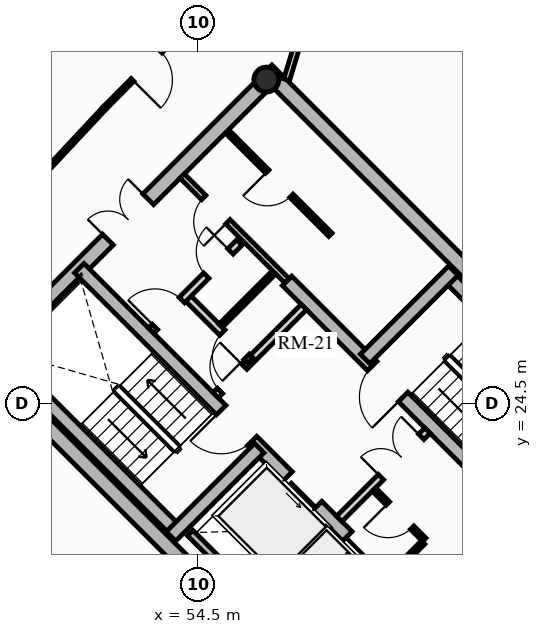
"""IFC4 building model, lengths in metres.
Left out: names, types, materials, properties, quantities, classifications, styles, units other than length and angle.
Written with IfcOpenShell. Run it as: python <this file> out.ifc"""

import sys

from ifc_helpers import new_model, si_unit, direction, frame, frame_2d, origin, origin_2d, place, context, subcontext, project, spatial, rectangle, hollow_circle, extrude, source, transform, mapped, element, fill, save


model = new_model("IFC4")
c1 = context("Model", 3, precision=1e-05, world=origin(), true_north=direction((0.0, 1.0)))
c2 = subcontext(c1, "Body", "Model", "MODEL_VIEW")
j1 = project(units=[si_unit("LENGTHUNIT", "METRE"), si_unit("PLANEANGLEUNIT", "RADIAN")], contexts=[c1])
p1 = place(None, origin())
s1 = spatial("IfcSite", under=j1, at=p1, CompositionType="ELEMENT")
p2 = place(p1, origin())
s2 = spatial("IfcBuilding", under=s1, at=p2, CompositionType="ELEMENT")
p3 = place(p2, frame((0.0, 0.0, 229.25)))
s3 = spatial("IfcBuildingStorey", under=s2, at=p3, CompositionType="ELEMENT", Elevation=229.25)
for number, where, z_axis, x_axis in (
    (1, (58.702, 15.732, 0.0), (0.0, 0.0, 1.0), (-0.707, 0.707, 0.0)),
    (2, (66.268, 23.298, 0.0), (0.0, 0.0, 1.0), (-0.707, 0.707, 0.0)),
):
    element("IfcWall", number, at=place(p3, frame(where, z_axis=z_axis, x_axis=x_axis)), inside=s3, PredefinedType="SHEAR", context=c2, shape_type="SweptSolid", body=[
        extrude(rectangle(XDim=14.1, YDim=0.4, at=frame_2d((7.05, 0.0))), origin(), (0.0, 0.0, 1.0), 3.2),
    ])
p4 = place(p3, frame((58.561, 15.873, 0.0), z_axis=(0.0, 0.0, 1.0), x_axis=(0.707106781187, 0.707106781187, 0.0)))
e3 = element("IfcWall", 3, at=p4, inside=s3, PredefinedType="SHEAR", context=c2, shape_type="SweptSolid", body=[
    extrude(rectangle(XDim=10.7, YDim=0.4, at=frame_2d((5.35, 0.0))), origin(), (0.0, 0.0, 1.0), 3.2),
])
m1 = source(origin(), c2, "Body", "SweptSolid", [
    extrude(rectangle(XDim=1.5, YDim=2.02, at=frame_2d((0.75, 1.01))), frame((0.0, 0.21, 0.0), z_axis=(0.0, -1.0, 0.0), x_axis=(1.0, 0.0, 0.0)), (0.0, 0.0, 1.0), 0.42),
])
p5 = place(p4, frame((5.45, 0.0, 0.0)))
e4 = element("IfcOpeningElement", 4, at=p5, cuts=e3, PredefinedType="OPENING", context=c2, shape_type="MappedRepresentation", body=[
    mapped(m1, transform((0.0, 0.0, 0.0), x_axis=(1.0, 0.0, 0.0), y_axis=(0.0, 1.0, 0.0), z_axis=(0.0, 0.0, 1.0), scale=1.0)),
])
p6 = place(p3, frame((48.873, 25.561, 0.0), z_axis=(0.0, 0.0, 1.0), x_axis=(0.707106781187, 0.707106781187, 0.0)))
e5 = element("IfcWall", 5, at=p6, inside=s3, PredefinedType="SHEAR", context=c2, shape_type="SweptSolid", body=[
    extrude(rectangle(XDim=10.7, YDim=0.4, at=frame_2d((5.35, 0.0))), origin(), (0.0, 0.0, 1.0), 3.2),
])
p7 = place(p6, frame((4.6, 0.0, 0.0)))
e6 = element("IfcOpeningElement", 6, at=p7, cuts=e5, PredefinedType="OPENING", context=c2, shape_type="MappedRepresentation", body=[
    mapped(m1, transform((0.0, 0.0, 0.0), x_axis=(1.0, 0.0, 0.0), y_axis=(0.0, 1.0, 0.0), z_axis=(0.0, 0.0, 1.0), scale=1.0)),
])
p8 = place(p3, frame((61.06, 18.373, 0.0), z_axis=(0.0, 0.0, 1.0), x_axis=(-0.707106781187, 0.707106781187, 0.0)))
e7 = element("IfcWall", 7, at=p8, inside=s3, PredefinedType="SHEAR", context=c2, shape_type="SweptSolid", body=[
    extrude(rectangle(XDim=13.7, YDim=0.35, at=frame_2d((6.85, 0.0))), origin(), (0.0, 0.0, 1.0), 3.2),
])
m2 = source(origin(), c2, "Body", "SweptSolid", [
    extrude(rectangle(XDim=1.1, YDim=2.015, at=frame_2d((0.55, 1.007))), frame((0.0, 0.185, 0.0), z_axis=(0.0, -1.0, 0.0), x_axis=(1.0, 0.0, 0.0)), (0.0, 0.0, 1.0), 0.37),
])
p9 = place(p8, frame((4.85, 0.0, 0.0)))
e8 = element("IfcOpeningElement", 8, at=p9, cuts=e7, PredefinedType="OPENING", context=c2, shape_type="MappedRepresentation", body=[
    mapped(m2, transform((0.0, 0.0, 0.0), x_axis=(1.0, 0.0, 0.0), y_axis=(0.0, 1.0, 0.0), z_axis=(0.0, 0.0, 1.0), scale=1.0)),
])
p10 = place(p8, frame((0.625, 0.0, 0.0)))
e9 = element("IfcOpeningElement", 9, at=p10, cuts=e7, PredefinedType="OPENING", context=c2, shape_type="MappedRepresentation", body=[
    mapped(m2, transform((0.0, 0.0, 0.0), x_axis=(1.0, 0.0, 0.0), y_axis=(0.0, 1.0, 0.0), z_axis=(0.0, 0.0, 1.0), scale=1.0)),
])
p11 = place(p8, frame((2.625, 0.0, 0.0)))
e10 = element("IfcOpeningElement", 10, at=p11, cuts=e7, PredefinedType="OPENING", context=c2, shape_type="MappedRepresentation", body=[
    mapped(m2, transform((0.0, 0.0, 0.0), x_axis=(1.0, 0.0, 0.0), y_axis=(0.0, 1.0, 0.0), z_axis=(0.0, 0.0, 1.0), scale=1.0)),
])
m3 = source(origin(), c2, "Body", "SweptSolid", [
    extrude(rectangle(XDim=1.15, YDim=2.02, at=frame_2d((0.575, 1.01))), frame((0.0, 0.185, 0.0), z_axis=(0.0, -1.0, 0.0), x_axis=(1.0, 0.0, 0.0)), (0.0, 0.0, 1.0), 0.37),
])
p12 = place(p8, frame((7.27, 0.0, 0.0)))
e11 = element("IfcOpeningElement", 11, at=p12, cuts=e7, PredefinedType="OPENING", context=c2, shape_type="MappedRepresentation", body=[
    mapped(m3, transform((0.0, 0.0, 0.0), x_axis=(1.0, 0.0, 0.0), y_axis=(0.0, 1.0, 0.0), z_axis=(0.0, 0.0, 1.0), scale=1.0)),
])
p13 = place(p3, frame((63.627, 20.94, 0.0), z_axis=(0.0, 0.0, 1.0), x_axis=(-0.707119496762, 0.707094065383, 0.0)))
e12 = element("IfcWall", 12, at=p13, inside=s3, PredefinedType="SHEAR", context=c2, shape_type="SweptSolid", body=[
    extrude(rectangle(XDim=9.6, YDim=0.35, at=frame_2d((4.8, 0.0))), origin(), (0.0, 0.0, 1.0), 3.2),
])
p14 = place(p13, frame((5.28, 0.0, 0.0)))
e13 = element("IfcOpeningElement", 13, at=p14, cuts=e12, PredefinedType="OPENING", context=c2, shape_type="MappedRepresentation", body=[
    mapped(m3, transform((0.0, 0.0, 0.0), x_axis=(1.0, 0.0, 0.0), y_axis=(0.0, 1.0, 0.0), z_axis=(0.0, 0.0, 1.0), scale=1.0)),
])
p15 = place(p3, frame((53.922, 21.141, 0.0), z_axis=(0.0, 0.0, 1.0), x_axis=(-0.707106781187, 0.707106781187, 0.0)))
e14 = element("IfcWall", 14, at=p15, inside=s3, PredefinedType="SHEAR", context=c2, shape_type="SweptSolid", body=[
    extrude(rectangle(XDim=6.695, YDim=0.35, at=frame_2d((3.348, 0.0))), origin(), (0.0, 0.0, 1.0), 3.2),
])
p16 = place(p3, frame((53.784, 21.003, 0.0), z_axis=(0.0, 0.0, 1.0), x_axis=(0.707106781187, 0.707106781187, 0.0)))
e15 = element("IfcWall", 15, at=p16, inside=s3, PredefinedType="SHEAR", context=c2, shape_type="SweptSolid", body=[
    extrude(rectangle(XDim=3.285, YDim=0.35, at=frame_2d((1.643, 0.0))), origin(), (0.0, 0.0, 1.0), 3.2),
])
p17 = place(p3, frame((65.812, 23.125, 0.0), z_axis=(0.0, 0.0, 1.0), x_axis=(-0.707106781187, 0.707106781187, 0.0)))
e16 = element("IfcWall", 16, at=p17, inside=s3, PredefinedType="SHEAR", context=c2, shape_type="SweptSolid", body=[
    extrude(rectangle(XDim=6.695, YDim=0.35, at=frame_2d((3.348, 0.0))), origin(), (0.0, 0.0, 1.0), 3.2),
])
p18 = place(p3, frame((58.893, 25.674, 0.0), z_axis=(0.0, 0.0, 1.0), x_axis=(0.707106781187, 0.707106781187, 0.0)))
e17 = element("IfcWall", 17, at=p18, inside=s3, PredefinedType="SHEAR", context=c2, shape_type="SweptSolid", body=[
    extrude(rectangle(XDim=3.285, YDim=0.35, at=frame_2d((1.643, 0.0))), origin(), (0.0, 0.0, 1.0), 3.2),
])
p19 = place(p3, frame((56.294, 33.024, 0.0), z_axis=(0.0, 0.0, 1.0), x_axis=(0.707106781187, 0.707106781187, 0.0)))
e18 = element("IfcColumn", 18, at=p19, inside=s3, PredefinedType="COLUMN", context=c2, shape_type="SweptSolid", body=[
    extrude(hollow_circle(Radius=0.33, WallThickness=0.025, at=origin_2d()), origin(), (0.0, 0.0, 1.0), 3.2),
])
p20 = place(p3, frame((55.888, 19.069, 0.0), z_axis=(0.0, 0.0, 1.0), x_axis=(0.707106781187, 0.707106781187, 0.0)))
e19 = element("IfcWall", 19, at=p20, inside=s3, PredefinedType="SHEAR", context=c2, shape_type="SweptSolid", body=[
    extrude(rectangle(XDim=2.97, YDim=0.2, at=frame_2d((1.485, 0.0))), origin(), (0.0, 0.0, 1.0), 3.2),
])
p21 = place(p3, frame((56.015, 19.366, 0.0), z_axis=(0.0, 0.0, 1.0), x_axis=(-0.707106781187, 0.707106781187, 0.0)))
e20 = element("IfcWall", 20, at=p21, inside=s3, PredefinedType="SHEAR", context=c2, shape_type="SweptSolid", body=[
    extrude(rectangle(XDim=2.44, YDim=0.2, at=frame_2d((1.22, 0.0))), origin(), (0.0, 0.0, 1.0), 3.2),
])
p22 = place(p3, frame((58.214, 21.467, 0.0), z_axis=(0.0, 0.0, 1.0), x_axis=(0.707106781187, 0.707106781187, 0.0)))
e21 = element("IfcWall", 21, at=p22, inside=s3, PredefinedType="PARTITIONING", context=c2, shape_type="SweptSolid", body=[
    extrude(rectangle(XDim=3.28, YDim=0.2, at=frame_2d((1.64, 0.0))), origin(), (0.0, 0.0, 1.0), 2.975),
])
m4 = source(origin(), c2, "Body", "SweptSolid", [
    extrude(rectangle(XDim=1.5, YDim=2.02, at=frame_2d((0.75, 1.01))), frame((0.0, 0.11, 0.0), z_axis=(0.0, -1.0, 0.0), x_axis=(1.0, 0.0, 0.0)), (0.0, 0.0, 1.0), 0.22),
])
p23 = place(p22, frame((1.55, 0.0, 0.0)))
e22 = element("IfcOpeningElement", 22, at=p23, cuts=e21, PredefinedType="OPENING", context=c2, shape_type="MappedRepresentation", body=[
    mapped(m4, transform((0.0, 0.0, 0.0), x_axis=(1.0, 0.0, 0.0), y_axis=(0.0, 1.0, 0.0), z_axis=(0.0, 0.0, 1.0), scale=1.0)),
])
p24 = place(p3, frame((54.961, 24.719, 0.0), z_axis=(0.0, 0.0, 1.0), x_axis=(0.707106781187, 0.707106781187, 0.0)))
e23 = element("IfcWall", 23, at=p24, inside=s3, PredefinedType="PARTITIONING", context=c2, shape_type="SweptSolid", body=[
    extrude(rectangle(XDim=3.28, YDim=0.2, at=frame_2d((1.64, 0.0))), origin(), (0.0, 0.0, 1.0), 2.975),
])
m5 = source(origin(), c2, "Body", "SweptSolid", [
    extrude(rectangle(XDim=0.9, YDim=2.005, at=frame_2d((0.45, 1.002))), frame((0.0, 0.11, 0.0), z_axis=(0.0, -1.0, 0.0), x_axis=(1.0, 0.0, 0.0)), (0.0, 0.0, 1.0), 0.22),
])
p25 = place(p24, frame((0.16, 0.0, 0.0)))
e24 = element("IfcOpeningElement", 24, at=p25, cuts=e23, PredefinedType="OPENING", context=c2, shape_type="MappedRepresentation", body=[
    mapped(m5, transform((0.0, 0.0, 0.0), x_axis=(1.0, 0.0, 0.0), y_axis=(0.0, 1.0, 0.0), z_axis=(0.0, 0.0, 1.0), scale=1.0)),
])
p26 = place(p3, frame((55.874, 25.631, 0.0), z_axis=(0.0, 0.0, 1.0), x_axis=(-0.707157639372, 0.707055919343, 0.0)))
e25 = element("IfcWall", 25, at=p26, inside=s3, PredefinedType="PARTITIONING", context=c2, shape_type="SweptSolid", body=[
    extrude(rectangle(XDim=2.4, YDim=0.2, at=frame_2d((1.2, 0.0))), origin(), (0.0, 0.0, 1.0), 2.975),
])
p27 = place(p26, frame((0.14, 0.0, 0.0)))
e26 = element("IfcOpeningElement", 26, at=p27, cuts=e25, PredefinedType="OPENING", context=c2, shape_type="MappedRepresentation", body=[
    mapped(m5, transform((0.0, 0.0, 0.0), x_axis=(1.0, 0.0, 0.0), y_axis=(0.0, 1.0, 0.0), z_axis=(0.0, 0.0, 1.0), scale=1.0)),
])
p28 = place(p3, frame((53.264, 26.416, 0.0), z_axis=(0.0, 0.0, 1.0), x_axis=(0.707106781187, 0.707106781187, 0.0)))
e27 = element("IfcWall", 27, at=p28, inside=s3, PredefinedType="PARTITIONING", context=c2, shape_type="SweptSolid", body=[
    extrude(rectangle(XDim=3.28, YDim=0.2, at=frame_2d((1.64, 0.0))), origin(), (0.0, 0.0, 1.0), 2.975),
])
m6 = source(origin(), c2, "Body", "SweptSolid", [
    extrude(rectangle(XDim=1.0, YDim=2.015, at=frame_2d((0.5, 1.007))), frame((0.0, 0.11, 0.0), z_axis=(0.0, -1.0, 0.0), x_axis=(1.0, 0.0, 0.0)), (0.0, 0.0, 1.0), 0.22),
])
p29 = place(p28, frame((0.14, 0.0, 0.0)))
e28 = element("IfcOpeningElement", 28, at=p29, cuts=e27, PredefinedType="OPENING", context=c2, shape_type="MappedRepresentation", body=[
    mapped(m6, transform((0.0, 0.0, 0.0), x_axis=(1.0, 0.0, 0.0), y_axis=(0.0, 1.0, 0.0), z_axis=(0.0, 0.0, 1.0), scale=1.0)),
])
p30 = place(p28, frame((2.05, 0.0, 0.0)))
e29 = element("IfcOpeningElement", 29, at=p30, cuts=e27, PredefinedType="OPENING", context=c2, shape_type="MappedRepresentation", body=[
    mapped(m5, transform((0.0, 0.0, 0.0), x_axis=(1.0, 0.0, 0.0), y_axis=(0.0, 1.0, 0.0), z_axis=(0.0, 0.0, 1.0), scale=1.0)),
])
p31 = place(p3, frame((60.448, 20.915, 0.0), z_axis=(0.0, 0.0, 1.0), x_axis=(-0.707106781187, 0.707106781187, 0.0)))
e30 = element("IfcWall", 30, at=p31, inside=s3, PredefinedType="PARTITIONING", context=c2, shape_type="SweptSolid", body=[
    extrude(rectangle(XDim=1.87, YDim=0.125, at=frame_2d((0.935, 0.0))), origin(), (0.0, 0.0, 1.0), 2.975),
])
m7 = source(origin(), c2, "Body", "SweptSolid", [
    extrude(rectangle(XDim=0.9, YDim=2.005, at=frame_2d((0.45, 1.002))), frame((0.0, 0.073, 0.0), z_axis=(0.0, -1.0, 0.0), x_axis=(1.0, 0.0, 0.0)), (0.0, 0.0, 1.0), 0.145),
])
p32 = place(p31, frame((0.45, 0.0, 0.0)))
e31 = element("IfcOpeningElement", 31, at=p32, cuts=e30, PredefinedType="OPENING", context=c2, shape_type="MappedRepresentation", body=[
    mapped(m7, transform((0.0, 0.0, 0.0), x_axis=(1.0, 0.0, 0.0), y_axis=(0.0, 1.0, 0.0), z_axis=(0.0, 0.0, 1.0), scale=1.0)),
])
p33 = place(p3, frame((59.643, 20.066, 0.0), z_axis=(0.0, 0.0, 1.0), x_axis=(0.707106781187, 0.707106781187, 0.0)))
e32 = element("IfcWall", 32, at=p33, inside=s3, PredefinedType="PARTITIONING", context=c2, shape_type="SweptSolid", body=[
    extrude(rectangle(XDim=1.1, YDim=0.125, at=frame_2d((0.55, 0.0))), origin(), (0.0, 0.0, 1.0), 2.975),
])
p34 = place(p3, frame((55.089, 26.543, 0.0), z_axis=(0.0, 0.0, 1.0), x_axis=(0.707106781187, 0.707106781187, 0.0)))
e33 = element("IfcWall", 33, at=p34, inside=s3, PredefinedType="PARTITIONING", context=c2, shape_type="SweptSolid", body=[
    extrude(rectangle(XDim=1.88, YDim=0.125, at=frame_2d((0.94, 0.0))), origin(), (0.0, 0.0, 1.0), 2.975),
])
p35 = place(p3, frame((56.839, 27.728, 0.0), z_axis=(0.0, 0.0, 1.0), x_axis=(-0.707106781187, 0.707106781187, 0.0)))
e34 = element("IfcWall", 34, at=p35, inside=s3, PredefinedType="PARTITIONING", context=c2, shape_type="SweptSolid", body=[
    extrude(rectangle(XDim=3.9, YDim=0.16, at=frame_2d((1.95, 0.0))), origin(), (0.0, 0.0, 1.0), 2.975),
])
m8 = source(origin(), c2, "Body", "SweptSolid", [
    extrude(rectangle(XDim=0.9, YDim=2.005, at=frame_2d((0.45, 1.002))), frame((0.0, 0.09, 0.0), z_axis=(0.0, -1.0, 0.0), x_axis=(1.0, 0.0, 0.0)), (0.0, 0.0, 1.0), 0.18),
])
p36 = place(p35, frame((2.2, 0.0, 0.0)))
e35 = element("IfcOpeningElement", 35, at=p36, cuts=e34, PredefinedType="OPENING", context=c2, shape_type="MappedRepresentation", body=[
    mapped(m8, transform((0.0, 0.0, 0.0), x_axis=(1.0, 0.0, 0.0), y_axis=(0.0, 1.0, 0.0), z_axis=(0.0, 0.0, 1.0), scale=1.0)),
])
p37 = place(p3, frame((57.981, 28.941, 0.0), z_axis=(0.0, 0.0, 1.0), x_axis=(-0.707074823725, 0.707138737204, 0.0)))
e36 = element("IfcWall", 36, at=p37, inside=s3, PredefinedType="PARTITIONING", context=c2, shape_type="SweptSolid", body=[
    extrude(rectangle(XDim=3.82, YDim=0.125, at=frame_2d((1.91, 0.0))), origin(), (0.0, 0.0, 1.0), 2.975),
])
p38 = place(p37, frame((1.45, 0.0, 0.0)))
e37 = element("IfcOpeningElement", 37, at=p38, cuts=e36, PredefinedType="OPENING", context=c2, shape_type="MappedRepresentation", body=[
    mapped(m7, transform((0.0, 0.0, 0.0), x_axis=(1.0, 0.0, 0.0), y_axis=(0.0, 1.0, 0.0), z_axis=(0.0, 0.0, 1.0), scale=1.0)),
])
p39 = place(p3, frame((54.427, 34.683, 0.0), z_axis=(0.0, 0.0, 1.0), x_axis=(-0.704178989986, -0.710022499687, 0.0)))
e38 = element("IfcWall", 38, at=p39, inside=s3, PredefinedType="MOVABLE", context=c2, shape_type="SweptSolid", body=[
    extrude(rectangle(XDim=3.384, YDim=0.1, at=frame_2d((1.692, 0.0))), origin(), (0.0, 0.0, 1.0), 2.612),
])
m9 = source(origin(), c2, "Body", "SweptSolid", [
    extrude(rectangle(XDim=1.05, YDim=2.015, at=frame_2d((0.525, 1.007))), frame((0.0, 0.06, 0.0), z_axis=(0.0, -1.0, 0.0), x_axis=(1.0, 0.0, 0.0)), (0.0, 0.0, 1.0), 0.12),
])
p40 = place(p39, frame((1.298, 0.0, 0.0)))
e39 = element("IfcOpeningElement", 39, at=p40, cuts=e38, PredefinedType="OPENING", context=c2, shape_type="MappedRepresentation", body=[
    mapped(m9, transform((0.0, 0.0, 0.0), x_axis=(1.0, 0.0, 0.0), y_axis=(0.0, 1.0, 0.0), z_axis=(0.0, 0.0, 1.0), scale=1.0)),
])
p41 = place(p3, frame((52.043, 32.28, 0.0), z_axis=(0.0, 0.0, 1.0), x_axis=(-0.682606081633, -0.730786519661, 0.0)))
e40 = element("IfcWall", 40, at=p41, inside=s3, PredefinedType="MOVABLE", context=c2, shape_type="SweptSolid", body=[
    extrude(rectangle(XDim=6.527, YDim=0.1, at=frame_2d((3.263, 0.0))), origin(), (0.0, 0.0, 1.0), 2.545),
])
p42 = place(p3, frame((47.706, 23.253, 0.0), z_axis=(0.0, 0.0, 1.0), x_axis=(0.696179266346, -0.717867974707, 0.0)))
e41 = element("IfcWall", 41, at=p42, inside=s3, PredefinedType="MOVABLE", context=c2, shape_type="SweptSolid", body=[
    extrude(rectangle(XDim=6.045, YDim=0.1, at=frame_2d((3.022, 0.0))), origin(), (0.0, 0.0, 1.0), 2.545),
])
p43 = place(p3, frame((56.828, 33.021, 0.0), z_axis=(0.0, 0.0, 1.0), x_axis=(0.292139093972, 0.956375841274, 0.0)))
e42 = element("IfcWall", 42, at=p43, inside=s3, PredefinedType="PARTITIONING", context=c2, shape_type="SweptSolid", body=[
    extrude(rectangle(XDim=2.186, YDim=0.16, at=frame_2d((1.093, 0.0))), origin(), (0.0, 0.0, 1.0), 2.545),
])
m10 = source(origin(), c2, "Body", "SweptSolid", [
    extrude(rectangle(XDim=1.05, YDim=2.015, at=frame_2d((0.525, 1.007))), frame((0.0, 0.09, 0.0), z_axis=(0.0, -1.0, 0.0), x_axis=(1.0, 0.0, 0.0)), (0.0, 0.0, 1.0), 0.18),
])
p44 = place(p43, frame((0.936, 0.0, 0.0)))
e43 = element("IfcOpeningElement", 43, at=p44, cuts=e42, PredefinedType="OPENING", context=c2, shape_type="MappedRepresentation", body=[
    mapped(m10, transform((0.0, 0.0, 0.0), x_axis=(1.0, 0.0, 0.0), y_axis=(0.0, 1.0, 0.0), z_axis=(0.0, 0.0, 1.0), scale=1.0)),
])
m11 = source(origin(), c2, "Body", "SweptSolid", [
    extrude(rectangle(XDim=1.1, YDim=2.015, at=frame_2d((0.55, 1.007))), frame((0.0, 0.025, 0.0), z_axis=(0.0, -1.0, 0.0), x_axis=(1.0, 0.0, 0.0)), (0.0, 0.0, 1.0), 0.05),
])
p45 = place(p9, origin())
e44 = element("IfcDoor", 44, at=p45, inside=s3, OperationType="SLIDING_TO_LEFT", PredefinedType="DOOR", context=c2, shape_type="MappedRepresentation", body=[
    mapped(m11, transform((0.0, 0.0, 0.0), x_axis=(1.0, 0.0, 0.0), y_axis=(0.0, 1.0, 0.0), z_axis=(0.0, 0.0, 1.0), scale=1.0)),
])
fill(e8, e44)
p46 = place(p11, origin())
e45 = element("IfcDoor", 45, at=p46, inside=s3, OperationType="SLIDING_TO_RIGHT", PredefinedType="DOOR", context=c2, shape_type="MappedRepresentation", body=[
    mapped(m11, transform((0.0, 0.0, 0.0), x_axis=(1.0, 0.0, 0.0), y_axis=(0.0, 1.0, 0.0), z_axis=(0.0, 0.0, 1.0), scale=1.0)),
])
fill(e10, e45)
m12 = source(origin(), c2, "Body", "SweptSolid", [
    extrude(rectangle(XDim=1.15, YDim=2.02, at=frame_2d((0.575, 1.01))), frame((0.0, 0.025, 0.0), z_axis=(0.0, -1.0, 0.0), x_axis=(1.0, 0.0, 0.0)), (0.0, 0.0, 1.0), 0.05),
])
p47 = place(p12, origin())
e46 = element("IfcDoor", 46, at=p47, inside=s3, OperationType="SINGLE_SWING_RIGHT", PredefinedType="DOOR", context=c2, shape_type="MappedRepresentation", body=[
    mapped(m12, transform((0.0, 0.0, 0.0), x_axis=(1.0, 0.0, 0.0), y_axis=(0.0, 1.0, 0.0), z_axis=(0.0, 0.0, 1.0), scale=1.0)),
])
fill(e11, e46)
p48 = place(p14, origin())
e47 = element("IfcDoor", 47, at=p48, inside=s3, OperationType="SINGLE_SWING_LEFT", PredefinedType="DOOR", context=c2, shape_type="MappedRepresentation", body=[
    mapped(m12, transform((0.0, 0.0, 0.0), x_axis=(1.0, 0.0, 0.0), y_axis=(0.0, 1.0, 0.0), z_axis=(0.0, 0.0, 1.0), scale=1.0)),
])
fill(e13, e47)
m13 = source(origin(), c2, "Body", "SweptSolid", [
    extrude(rectangle(XDim=1.5, YDim=2.02, at=frame_2d((0.75, 1.01))), frame((0.0, 0.025, 0.0), z_axis=(0.0, -1.0, 0.0), x_axis=(1.0, 0.0, 0.0)), (0.0, 0.0, 1.0), 0.05),
])
p49 = place(p7, origin())
e48 = element("IfcDoor", 48, at=p49, inside=s3, OperationType="DOUBLE_DOOR_SINGLE_SWING", PredefinedType="DOOR", context=c2, shape_type="MappedRepresentation", body=[
    mapped(m13, transform((0.0, 0.0, 0.0), x_axis=(1.0, 0.0, 0.0), y_axis=(0.0, 1.0, 0.0), z_axis=(0.0, 0.0, 1.0), scale=1.0)),
])
fill(e6, e48)
p50 = place(p23, origin())
e49 = element("IfcDoor", 49, at=p50, inside=s3, OperationType="DOUBLE_DOOR_SINGLE_SWING", PredefinedType="DOOR", context=c2, shape_type="MappedRepresentation", body=[
    mapped(m13, transform((0.0, 0.0, 0.0), x_axis=(1.0, 0.0, 0.0), y_axis=(0.0, 1.0, 0.0), z_axis=(0.0, 0.0, 1.0), scale=1.0)),
])
fill(e22, e49)
m14 = source(origin(), c2, "Body", "SweptSolid", [
    extrude(rectangle(XDim=0.9, YDim=2.005, at=frame_2d((0.45, 1.002))), frame((0.0, 0.025, 0.0), z_axis=(0.0, -1.0, 0.0), x_axis=(1.0, 0.0, 0.0)), (0.0, 0.0, 1.0), 0.05),
])
p51 = place(p25, origin())
e50 = element("IfcDoor", 50, at=p51, inside=s3, OperationType="SINGLE_SWING_RIGHT", PredefinedType="DOOR", context=c2, shape_type="MappedRepresentation", body=[
    mapped(m14, transform((0.0, 0.0, 0.0), x_axis=(1.0, 0.0, 0.0), y_axis=(0.0, 1.0, 0.0), z_axis=(0.0, 0.0, 1.0), scale=1.0)),
])
fill(e24, e50)
m15 = source(origin(), c2, "Body", "SweptSolid", [
    extrude(rectangle(XDim=1.0, YDim=2.015, at=frame_2d((0.5, 1.007))), frame((0.0, 0.025, 0.0), z_axis=(0.0, -1.0, 0.0), x_axis=(1.0, 0.0, 0.0)), (0.0, 0.0, 1.0), 0.05),
])
p52 = place(p29, origin())
e51 = element("IfcDoor", 51, at=p52, inside=s3, OperationType="SINGLE_SWING_LEFT", PredefinedType="DOOR", context=c2, shape_type="MappedRepresentation", body=[
    mapped(m15, transform((0.0, 0.0, 0.0), x_axis=(1.0, 0.0, 0.0), y_axis=(0.0, 1.0, 0.0), z_axis=(0.0, 0.0, 1.0), scale=1.0)),
])
fill(e28, e51)
p53 = place(p32, origin())
e52 = element("IfcDoor", 52, at=p53, inside=s3, OperationType="SINGLE_SWING_RIGHT", PredefinedType="DOOR", context=c2, shape_type="MappedRepresentation", body=[
    mapped(m14, transform((0.0, 0.0, 0.0), x_axis=(1.0, 0.0, 0.0), y_axis=(0.0, 1.0, 0.0), z_axis=(0.0, 0.0, 1.0), scale=1.0)),
])
fill(e31, e52)
p54 = place(p27, origin())
e53 = element("IfcDoor", 53, at=p54, inside=s3, OperationType="SINGLE_SWING_LEFT", PredefinedType="DOOR", context=c2, shape_type="MappedRepresentation", body=[
    mapped(m14, transform((0.0, 0.0, 0.0), x_axis=(1.0, 0.0, 0.0), y_axis=(0.0, 1.0, 0.0), z_axis=(0.0, 0.0, 1.0), scale=1.0)),
])
fill(e26, e53)
p55 = place(p30, origin())
e54 = element("IfcDoor", 54, at=p55, inside=s3, OperationType="SINGLE_SWING_RIGHT", PredefinedType="DOOR", context=c2, shape_type="MappedRepresentation", body=[
    mapped(m14, transform((0.0, 0.0, 0.0), x_axis=(1.0, 0.0, 0.0), y_axis=(0.0, 1.0, 0.0), z_axis=(0.0, 0.0, 1.0), scale=1.0)),
])
fill(e29, e54)
p56 = place(p36, origin())
e55 = element("IfcDoor", 55, at=p56, inside=s3, OperationType="SINGLE_SWING_LEFT", PredefinedType="DOOR", context=c2, shape_type="MappedRepresentation", body=[
    mapped(m14, transform((0.0, 0.0, 0.0), x_axis=(1.0, 0.0, 0.0), y_axis=(0.0, 1.0, 0.0), z_axis=(0.0, 0.0, 1.0), scale=1.0)),
])
fill(e35, e55)
p57 = place(p38, origin())
e56 = element("IfcDoor", 56, at=p57, inside=s3, OperationType="SINGLE_SWING_RIGHT", PredefinedType="DOOR", context=c2, shape_type="MappedRepresentation", body=[
    mapped(m14, transform((0.0, 0.0, 0.0), x_axis=(1.0, 0.0, 0.0), y_axis=(0.0, 1.0, 0.0), z_axis=(0.0, 0.0, 1.0), scale=1.0)),
])
fill(e37, e56)
m16 = source(origin(), c2, "Body", "SweptSolid", [
    extrude(rectangle(XDim=1.05, YDim=2.015, at=frame_2d((0.525, 1.007))), frame((0.0, 0.025, 0.0), z_axis=(0.0, -1.0, 0.0), x_axis=(1.0, 0.0, 0.0)), (0.0, 0.0, 1.0), 0.05),
])
p58 = place(p40, origin())
e57 = element("IfcDoor", 57, at=p58, inside=s3, OperationType="SINGLE_SWING_RIGHT", PredefinedType="DOOR", context=c2, shape_type="MappedRepresentation", body=[
    mapped(m16, transform((0.0, 0.0, 0.0), x_axis=(1.0, 0.0, 0.0), y_axis=(0.0, 1.0, 0.0), z_axis=(0.0, 0.0, 1.0), scale=1.0)),
])
fill(e39, e57)
save(model, sys.argv[1])
